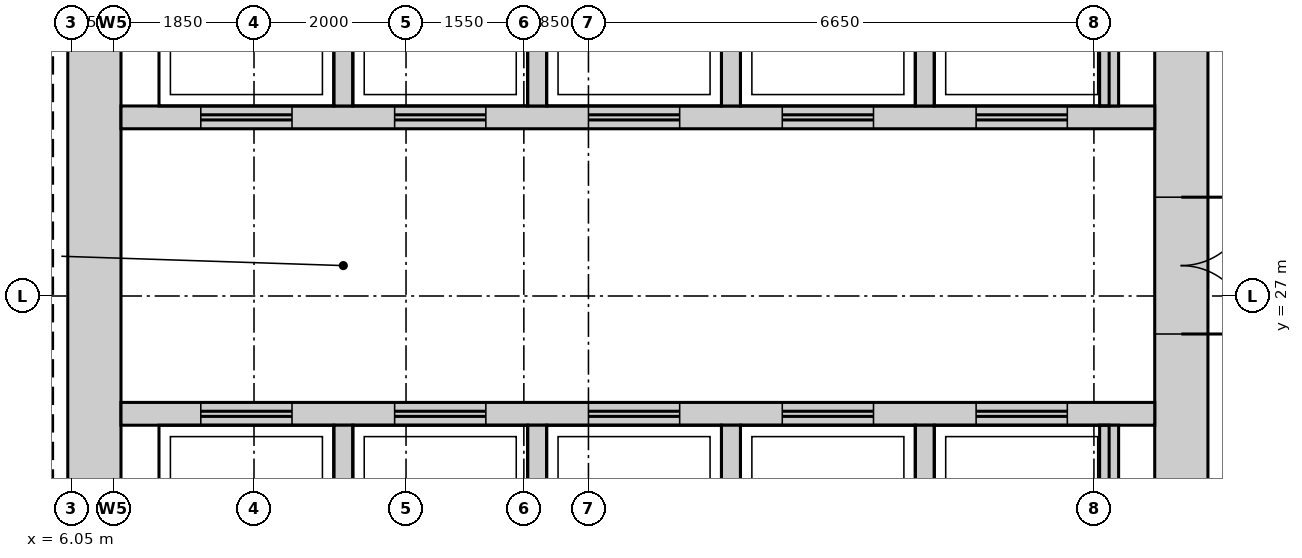
"""IFC4 building model, lengths in metres.
Left out: names, types, materials, properties, quantities, classifications, styles, units other than length and angle.
Written with IfcOpenShell. Run it as: python <this file> out.ifc"""

import sys

from ifc_helpers import new_model, si_unit, direction, frame, frame_2d, origin, place, context, subcontext, project, spatial, rectangle, extrude, source, transform, mapped, element, fill, save


model = new_model("IFC4")
c1 = context("Model", 3, precision=1e-05, world=origin(), true_north=direction((0.0, 1.0)))
c2 = subcontext(c1, "Body", "Model", "MODEL_VIEW")
j1 = project(units=[si_unit("LENGTHUNIT", "METRE"), si_unit("PLANEANGLEUNIT", "RADIAN")], contexts=[c1])
p1 = place(None, origin())
s1 = spatial("IfcSite", under=j1, at=p1, CompositionType="ELEMENT")
p2 = place(p1, origin())
s2 = spatial("IfcBuilding", under=s1, at=p2, CompositionType="ELEMENT")
p3 = place(p2, frame((0.0, 0.0, 250.2)))
s3 = spatial("IfcBuildingStorey", under=s2, at=p3, CompositionType="ELEMENT", Elevation=250.2)
m1 = source(origin(), c2, "Body", "SweptSolid", [
    extrude(rectangle(XDim=22.6, YDim=0.7, at=frame_2d((11.3, 0.0))), origin(), (0.0, 0.0, 1.0), 3.75),
])
p4 = place(p3, frame((20.65, 15.7, 0.0), z_axis=(0.0, 0.0, 1.0), x_axis=(0.0, 1.0, 0.0)))
e1 = element("IfcWall", 1, at=p4, inside=s3, PredefinedType="SHEAR", context=c2, shape_type="MappedRepresentation", body=[
    mapped(m1, transform((0.0, 0.0, 0.0))),
])
m2 = source(origin(), c2, "Body", "SweptSolid", [
    extrude(rectangle(XDim=1.8, YDim=2.1, at=frame_2d((0.9, 1.05))), frame((0.0, 0.36, 0.0), z_axis=(0.0, -1.0, 0.0), x_axis=(1.0, 0.0, 0.0)), (0.0, 0.0, 1.0), 0.72),
])
p5 = place(p4, frame((10.8, 0.0, 0.0)))
e2 = element("IfcOpeningElement", 2, at=p5, cuts=e1, PredefinedType="OPENING", context=c2, shape_type="MappedRepresentation", body=[
    mapped(m2, transform((0.0, 0.0, 0.0))),
])
m3 = source(origin(), c2, "Body", "SweptSolid", [
    extrude(rectangle(XDim=0.9, YDim=2.1, at=frame_2d((0.45, 1.05))), frame((0.0, 0.36, 0.0), z_axis=(0.0, -1.0, 0.0), x_axis=(1.0, 0.0, 0.0)), (0.0, 0.0, 1.0), 0.72),
])
p6 = place(p4, frame((0.45, 0.0, 0.0)))
e3 = element("IfcOpeningElement", 3, at=p6, cuts=e1, PredefinedType="OPENING", context=c2, shape_type="MappedRepresentation", body=[
    mapped(m3, transform((0.0, 0.0, 0.0))),
])
p7 = place(p4, frame((2.9, 0.0, 0.0)))
e4 = element("IfcOpeningElement", 4, at=p7, cuts=e1, PredefinedType="OPENING", context=c2, shape_type="MappedRepresentation", body=[
    mapped(m3, transform((0.0, 0.0, 0.0))),
])
p8 = place(p4, frame((5.65, 0.0, 0.0)))
e5 = element("IfcOpeningElement", 5, at=p8, cuts=e1, PredefinedType="OPENING", context=c2, shape_type="MappedRepresentation", body=[
    mapped(m3, transform((0.0, 0.0, 0.0))),
])
p9 = place(p3, frame((6.35, 15.7, 0.0), z_axis=(0.0, 0.0, 1.0), x_axis=(0.0, 1.0, 0.0)))
e6 = element("IfcWall", 6, at=p9, inside=s3, PredefinedType="SHEAR", context=c2, shape_type="MappedRepresentation", body=[
    mapped(m1, transform((0.0, 0.0, 0.0))),
])
m4 = source(origin(), c2, "Body", "SweptSolid", [
    extrude(rectangle(XDim=13.6, YDim=0.3, at=frame_2d((6.8, 0.0))), origin(), (0.0, 0.0, 1.0), 3.75),
])
p10 = place(p3, frame((6.7, 29.35, 0.0), z_axis=(0.0, 0.0, 1.0), x_axis=(1.0, 0.0, 0.0)))
e7 = element("IfcWall", 7, at=p10, inside=s3, PredefinedType="STANDARD", context=c2, shape_type="MappedRepresentation", body=[
    mapped(m4, transform((0.0, 0.0, 0.0))),
])
m5 = source(origin(), c2, "Body", "SweptSolid", [
    extrude(rectangle(XDim=1.2, YDim=2.1, at=frame_2d((0.6, 1.05))), frame((0.0, 0.16, 0.0), z_axis=(0.0, -1.0, 0.0), x_axis=(1.0, 0.0, 0.0)), (0.0, 0.0, 1.0), 0.32),
])
p11 = place(p10, frame((1.05, 0.0, 0.0)))
e8 = element("IfcOpeningElement", 8, at=p11, cuts=e7, PredefinedType="OPENING", context=c2, shape_type="MappedRepresentation", body=[
    mapped(m5, transform((0.0, 0.0, 0.0))),
])
p12 = place(p10, frame((3.6, 0.0, 0.0)))
e9 = element("IfcOpeningElement", 9, at=p12, cuts=e7, PredefinedType="OPENING", context=c2, shape_type="MappedRepresentation", body=[
    mapped(m5, transform((0.0, 0.0, 0.0))),
])
p13 = place(p10, frame((6.15, 0.0, 0.0)))
e10 = element("IfcOpeningElement", 10, at=p13, cuts=e7, PredefinedType="OPENING", context=c2, shape_type="MappedRepresentation", body=[
    mapped(m5, transform((0.0, 0.0, 0.0))),
])
p14 = place(p10, frame((8.7, 0.0, 0.0)))
e11 = element("IfcOpeningElement", 11, at=p14, cuts=e7, PredefinedType="OPENING", context=c2, shape_type="MappedRepresentation", body=[
    mapped(m5, transform((0.0, 0.0, 0.0))),
])
p15 = place(p10, frame((11.25, 0.0, 0.0)))
e12 = element("IfcOpeningElement", 12, at=p15, cuts=e7, PredefinedType="OPENING", context=c2, shape_type="MappedRepresentation", body=[
    mapped(m5, transform((0.0, 0.0, 0.0))),
])
p16 = place(p3, frame((6.7, 25.45, 0.0), z_axis=(0.0, 0.0, 1.0), x_axis=(1.0, 0.0, 0.0)))
e13 = element("IfcWall", 13, at=p16, inside=s3, PredefinedType="STANDARD", context=c2, shape_type="MappedRepresentation", body=[
    mapped(m4, transform((0.0, 0.0, 0.0))),
])
p17 = place(p16, frame((1.05, 0.0, 0.0)))
e14 = element("IfcOpeningElement", 14, at=p17, cuts=e13, PredefinedType="OPENING", context=c2, shape_type="MappedRepresentation", body=[
    mapped(m5, transform((0.0, 0.0, 0.0))),
])
p18 = place(p16, frame((3.6, 0.0, 0.0)))
e15 = element("IfcOpeningElement", 15, at=p18, cuts=e13, PredefinedType="OPENING", context=c2, shape_type="MappedRepresentation", body=[
    mapped(m5, transform((0.0, 0.0, 0.0))),
])
p19 = place(p16, frame((6.15, 0.0, 0.0)))
e16 = element("IfcOpeningElement", 16, at=p19, cuts=e13, PredefinedType="OPENING", context=c2, shape_type="MappedRepresentation", body=[
    mapped(m5, transform((0.0, 0.0, 0.0))),
])
p20 = place(p16, frame((8.7, 0.0, 0.0)))
e17 = element("IfcOpeningElement", 17, at=p20, cuts=e13, PredefinedType="OPENING", context=c2, shape_type="MappedRepresentation", body=[
    mapped(m5, transform((0.0, 0.0, 0.0))),
])
p21 = place(p16, frame((11.25, 0.0, 0.0)))
e18 = element("IfcOpeningElement", 18, at=p21, cuts=e13, PredefinedType="OPENING", context=c2, shape_type="MappedRepresentation", body=[
    mapped(m5, transform((0.0, 0.0, 0.0))),
])
m6 = source(origin(), c2, "Body", "SweptSolid", [
    extrude(rectangle(XDim=2.4, YDim=0.25, at=frame_2d((1.2, 0.0))), origin(), (0.0, 0.0, 1.0), 3.75),
])
for number, where, z_axis, x_axis in (
    (19, (17.275, 29.5, 0.0), (0.0, 0.0, 1.0), (0.0, 1.0, 0.0)),
    (20, (19.7, 29.5, 0.0), (0.0, 0.0, 1.0), (0.0, 1.0, 0.0)),
    (21, (9.625, 29.5, 0.0), (0.0, 0.0, 1.0), (0.0, 1.0, 0.0)),
    (22, (12.175, 29.5, 0.0), (0.0, 0.0, 1.0), (0.0, 1.0, 0.0)),
    (23, (14.725, 29.5, 0.0), (0.0, 0.0, 1.0), (0.0, 1.0, 0.0)),
):
    element("IfcWall", number, at=place(p3, frame(where, z_axis=z_axis, x_axis=x_axis)), inside=s3, PredefinedType="STANDARD", context=c2, shape_type="MappedRepresentation", body=[
        mapped(m6, transform((0.0, 0.0, 0.0))),
    ])
m7 = source(origin(), c2, "Body", "SweptSolid", [
    extrude(rectangle(XDim=2.4, YDim=0.25, at=frame_2d((1.2, 0.0))), origin(), (0.0, 0.0, 1.0), 3.75),
])
for number, where, z_axis, x_axis in (
    (24, (17.275, 22.9, 0.0), (0.0, 0.0, 1.0), (0.0, 1.0, 0.0)),
    (25, (19.7, 22.9, 0.0), (0.0, 0.0, 1.0), (0.0, 1.0, 0.0)),
    (26, (9.625, 22.9, 0.0), (0.0, 0.0, 1.0), (0.0, 1.0, 0.0)),
    (27, (12.175, 22.9, 0.0), (0.0, 0.0, 1.0), (0.0, 1.0, 0.0)),
    (28, (14.725, 22.9, 0.0), (0.0, 0.0, 1.0), (0.0, 1.0, 0.0)),
):
    element("IfcWall", number, at=place(p3, frame(where, z_axis=z_axis, x_axis=x_axis)), inside=s3, PredefinedType="STANDARD", context=c2, shape_type="MappedRepresentation", body=[
        mapped(m7, transform((0.0, 0.0, 0.0))),
    ])
m8 = source(origin(), c2, "Body", "SweptSolid", [
    extrude(rectangle(XDim=1.8, YDim=2.1, at=frame_2d((0.9, 1.05))), frame((0.0, 0.3, 0.0), z_axis=(0.0, -1.0, 0.0), x_axis=(1.0, 0.0, 0.0)), (0.0, 0.0, 1.0), 0.6),
])
p22 = place(p5, origin())
e29 = element("IfcDoor", 29, at=p22, inside=s3, OperationType="DOUBLE_DOOR_SINGLE_SWING", PredefinedType="DOOR", context=c2, shape_type="MappedRepresentation", body=[
    mapped(m8, transform((0.0, 0.0, 0.0))),
])
fill(e2, e29)
m9 = source(origin(), c2, "Body", "SweptSolid", [
    extrude(rectangle(XDim=1.2, YDim=2.1, at=frame_2d((0.6, 1.05))), frame((0.0, 0.025, 0.0), z_axis=(0.0, -1.0, 0.0), x_axis=(1.0, 0.0, 0.0)), (0.0, 0.0, 1.0), 0.05),
])
p23 = place(p17, origin())
e30 = element("IfcDoor", 30, at=p23, inside=s3, OperationType="DOUBLE_DOOR_SLIDING", PredefinedType="DOOR", context=c2, shape_type="MappedRepresentation", body=[
    mapped(m9, transform((0.0, 0.0, 0.0))),
])
fill(e14, e30)
p24 = place(p18, origin())
e31 = element("IfcDoor", 31, at=p24, inside=s3, OperationType="DOUBLE_DOOR_SLIDING", PredefinedType="DOOR", context=c2, shape_type="MappedRepresentation", body=[
    mapped(m9, transform((0.0, 0.0, 0.0))),
])
fill(e15, e31)
p25 = place(p19, origin())
e32 = element("IfcDoor", 32, at=p25, inside=s3, OperationType="DOUBLE_DOOR_SLIDING", PredefinedType="DOOR", context=c2, shape_type="MappedRepresentation", body=[
    mapped(m9, transform((0.0, 0.0, 0.0))),
])
fill(e16, e32)
p26 = place(p20, origin())
e33 = element("IfcDoor", 33, at=p26, inside=s3, OperationType="DOUBLE_DOOR_SLIDING", PredefinedType="DOOR", context=c2, shape_type="MappedRepresentation", body=[
    mapped(m9, transform((0.0, 0.0, 0.0))),
])
fill(e17, e33)
p27 = place(p21, origin())
e34 = element("IfcDoor", 34, at=p27, inside=s3, OperationType="DOUBLE_DOOR_SLIDING", PredefinedType="DOOR", context=c2, shape_type="MappedRepresentation", body=[
    mapped(m9, transform((0.0, 0.0, 0.0))),
])
fill(e18, e34)
p28 = place(p11, origin())
e35 = element("IfcDoor", 35, at=p28, inside=s3, OperationType="DOUBLE_DOOR_SLIDING", PredefinedType="DOOR", context=c2, shape_type="MappedRepresentation", body=[
    mapped(m9, transform((0.0, 0.0, 0.0))),
])
fill(e8, e35)
p29 = place(p12, origin())
e36 = element("IfcDoor", 36, at=p29, inside=s3, OperationType="DOUBLE_DOOR_SLIDING", PredefinedType="DOOR", context=c2, shape_type="MappedRepresentation", body=[
    mapped(m9, transform((0.0, 0.0, 0.0))),
])
fill(e9, e36)
p30 = place(p13, origin())
e37 = element("IfcDoor", 37, at=p30, inside=s3, OperationType="DOUBLE_DOOR_SLIDING", PredefinedType="DOOR", context=c2, shape_type="MappedRepresentation", body=[
    mapped(m9, transform((0.0, 0.0, 0.0))),
])
fill(e10, e37)
p31 = place(p14, origin())
e38 = element("IfcDoor", 38, at=p31, inside=s3, OperationType="DOUBLE_DOOR_SLIDING", PredefinedType="DOOR", context=c2, shape_type="MappedRepresentation", body=[
    mapped(m9, transform((0.0, 0.0, 0.0))),
])
fill(e11, e38)
p32 = place(p15, origin())
e39 = element("IfcDoor", 39, at=p32, inside=s3, OperationType="DOUBLE_DOOR_SLIDING", PredefinedType="DOOR", context=c2, shape_type="MappedRepresentation", body=[
    mapped(m9, transform((0.0, 0.0, 0.0))),
])
fill(e12, e39)
save(model, sys.argv[1])
